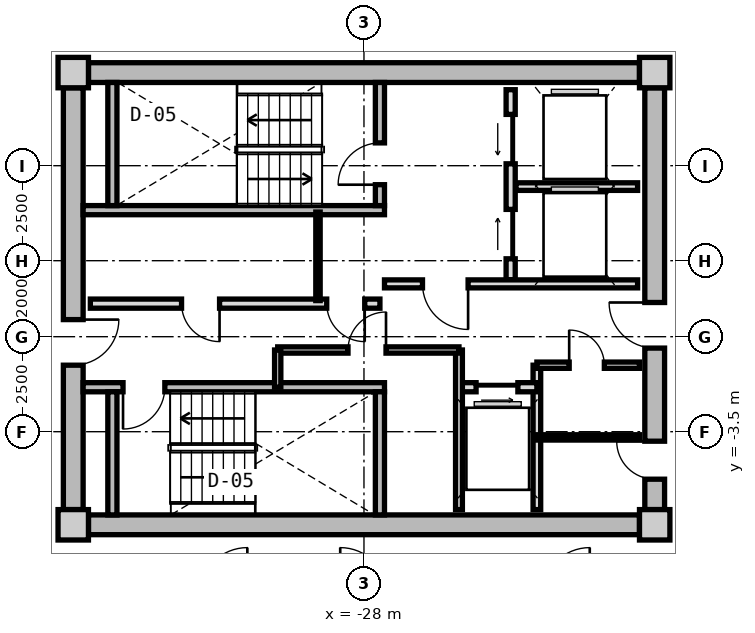
"""IFC4 building model, lengths in metres.
Left out: names, types, materials, properties, quantities, classifications, styles, units other than length and angle.
Written with IfcOpenShell. Run it as: python <this file> out.ifc"""

import sys

from ifc_helpers import new_model, si_unit, direction, frame, frame_2d, origin, origin_2d, place, context, subcontext, project, spatial, rectangle, extrude, source, transform, mapped, element, fill, save


model = new_model("IFC4")
c1 = context("Model", 3, precision=1e-05, world=origin(), true_north=direction((0.0, 1.0)))
c2 = subcontext(c1, "Body", "Model", "MODEL_VIEW")
j1 = project(units=[si_unit("LENGTHUNIT", "METRE"), si_unit("PLANEANGLEUNIT", "RADIAN")], contexts=[c1])
p1 = place(None, origin())
s1 = spatial("IfcSite", under=j1, at=p1, CompositionType="ELEMENT")
p2 = place(p1, origin())
s2 = spatial("IfcBuilding", under=s1, at=p2, CompositionType="ELEMENT")
p3 = place(p2, frame((0.0, 0.0, 207.8)))
s3 = spatial("IfcBuildingStorey", under=s2, at=p3, CompositionType="ELEMENT", Elevation=207.8)
m1 = source(origin(), c2, "Body", "SweptSolid", [
    extrude(rectangle(XDim=0.8, YDim=0.8, at=origin_2d()), origin(), (0.0, 0.0, 1.0), 3.05),
])
for number, where, z_axis, x_axis in (
    (1, (-35.65, -5.95, 0.0), (0.0, 0.0, 1.0), (1.0, 0.0, 0.0)),
    (2, (-20.35, -5.95, 0.0), (0.0, 0.0, 1.0), (1.0, 0.0, 0.0)),
    (3, (-20.35, 5.95, 0.0), (0.0, 0.0, 1.0), (1.0, 0.0, 0.0)),
    (4, (-35.65, 5.95, 0.0), (0.0, 0.0, 1.0), (1.0, 0.0, 0.0)),
):
    element("IfcColumn", number, at=place(p3, frame(where, z_axis=z_axis, x_axis=x_axis)), inside=s3, PredefinedType="COLUMN", context=c2, shape_type="MappedRepresentation", body=[
        mapped(m1, transform((0.0, 0.0, 0.0), x_axis=(1.0, 0.0, 0.0), y_axis=(0.0, 1.0, 0.0), z_axis=(0.0, 0.0, 1.0), scale=1.0)),
    ])
m2 = source(origin(), c2, "Body", "SweptSolid", [
    extrude(rectangle(XDim=14.5, YDim=0.52, at=frame_2d((7.25, 0.0))), origin(), (0.0, 0.0, 1.0), 2.76),
])
for number, where, z_axis, x_axis in (
    (5, (-35.25, 5.95, 0.0), (0.0, 0.0, 1.0), (1.0, 0.0, 0.0)),
    (6, (-20.75, -5.95, 0.0), (0.0, 0.0, 1.0), (-1.0, 0.0, 0.0)),
):
    element("IfcWall", number, at=place(p3, frame(where, z_axis=z_axis, x_axis=x_axis)), inside=s3, PredefinedType="SHEAR", context=c2, shape_type="MappedRepresentation", body=[
        mapped(m2, transform((0.0, 0.0, 0.0), x_axis=(1.0, 0.0, 0.0), y_axis=(0.0, 1.0, 0.0), z_axis=(0.0, 0.0, 1.0), scale=1.0)),
    ])
m3 = source(origin(), c2, "Body", "SweptSolid", [
    extrude(rectangle(XDim=11.1, YDim=0.52, at=frame_2d((5.55, 0.0))), origin(), (0.0, 0.0, 1.0), 2.76),
])
p4 = place(p3, frame((-35.65, -5.55, 0.0), z_axis=(0.0, 0.0, 1.0), x_axis=(0.0, 1.0, 0.0)))
e7 = element("IfcWall", 7, at=p4, inside=s3, PredefinedType="SHEAR", context=c2, shape_type="MappedRepresentation", body=[
    mapped(m3, transform((0.0, 0.0, 0.0), x_axis=(1.0, 0.0, 0.0), y_axis=(0.0, 1.0, 0.0), z_axis=(0.0, 0.0, 1.0), scale=1.0)),
])
p5 = place(p4, frame((3.8, 0.0, 0.0)))
e8 = element("IfcOpeningElement", 8, at=p5, cuts=e7, PredefinedType="OPENING", context=c2, shape_type="SweptSolid", body=[
    extrude(rectangle(XDim=1.2, YDim=2.15, at=frame_2d((0.6, 1.075))), frame((0.0, 0.27, 0.0), z_axis=(0.0, -1.0, 0.0), x_axis=(1.0, 0.0, 0.0)), (0.0, 0.0, 1.0), 0.54),
])
p6 = place(p3, frame((-20.35, 5.55, 0.0), z_axis=(0.0, 0.0, 1.0), x_axis=(0.0, -1.0, 0.0)))
e9 = element("IfcWall", 9, at=p6, inside=s3, PredefinedType="SHEAR", context=c2, shape_type="MappedRepresentation", body=[
    mapped(m3, transform((0.0, 0.0, 0.0), x_axis=(1.0, 0.0, 0.0), y_axis=(0.0, 1.0, 0.0), z_axis=(0.0, 0.0, 1.0), scale=1.0)),
])
p7 = place(p6, frame((5.65, 0.0, 0.0)))
e10 = element("IfcOpeningElement", 10, at=p7, cuts=e9, PredefinedType="OPENING", context=c2, shape_type="SweptSolid", body=[
    extrude(rectangle(XDim=1.2, YDim=2.15, at=frame_2d((0.6, 1.075))), frame((0.0, 0.27, 0.0), z_axis=(0.0, -1.0, 0.0), x_axis=(1.0, 0.0, 0.0)), (0.0, 0.0, 1.0), 0.54),
])
p8 = place(p6, frame((9.3, 0.0, 0.0)))
e11 = element("IfcOpeningElement", 11, at=p8, cuts=e9, PredefinedType="OPENING", context=c2, shape_type="SweptSolid", body=[
    extrude(rectangle(XDim=1.0, YDim=2.1, at=frame_2d((0.5, 1.05))), frame((0.0, 0.27, 0.0), z_axis=(0.0, -1.0, 0.0), x_axis=(1.0, 0.0, 0.0)), (0.0, 0.0, 1.0), 0.54),
])
m4 = source(origin(), c2, "Body", "SweptSolid", [
    extrude(rectangle(XDim=7.93, YDim=0.24, at=frame_2d((3.965, 0.0))), origin(), (0.0, 0.0, 1.0), 2.76),
])
p9 = place(p3, frame((-35.39, 2.33, 0.0), z_axis=(0.0, 0.0, 1.0), x_axis=(1.0, 0.0, 0.0)))
e12 = element("IfcWall", 12, at=p9, inside=s3, PredefinedType="PARTITIONING", context=c2, shape_type="MappedRepresentation", body=[
    mapped(m4, transform((0.0, 0.0, 0.0), x_axis=(1.0, 0.0, 0.0), y_axis=(0.0, 1.0, 0.0), z_axis=(0.0, 0.0, 1.0), scale=1.0)),
])
m5 = source(origin(), c2, "Body", "SweptSolid", [
    extrude(rectangle(XDim=3.24, YDim=0.24, at=frame_2d((1.62, 0.0))), origin(), (0.0, 0.0, 1.0), 2.76),
])
p10 = place(p3, frame((-34.62, 2.45, 0.0), z_axis=(0.0, 0.0, 1.0), x_axis=(0.0, 1.0, 0.0)))
e13 = element("IfcWall", 13, at=p10, inside=s3, PredefinedType="PARTITIONING", context=c2, shape_type="MappedRepresentation", body=[
    mapped(m5, transform((0.0, 0.0, 0.0), x_axis=(1.0, 0.0, 0.0), y_axis=(0.0, 1.0, 0.0), z_axis=(0.0, 0.0, 1.0), scale=1.0)),
])
p11 = place(p3, frame((-27.58, 2.45, 0.0), z_axis=(0.0, 0.0, 1.0), x_axis=(0.0, 1.0, 0.0)))
e14 = element("IfcWall", 14, at=p11, inside=s3, PredefinedType="PARTITIONING", context=c2, shape_type="MappedRepresentation", body=[
    mapped(m5, transform((0.0, 0.0, 0.0), x_axis=(1.0, 0.0, 0.0), y_axis=(0.0, 1.0, 0.0), z_axis=(0.0, 0.0, 1.0), scale=1.0)),
])
p12 = place(p11, frame((0.55, 0.0, 0.0)))
e15 = element("IfcOpeningElement", 15, at=p12, cuts=e14, PredefinedType="OPENING", context=c2, shape_type="SweptSolid", body=[
    extrude(rectangle(XDim=1.1, YDim=2.15, at=frame_2d((0.55, 1.075))), frame((0.0, 0.13, 0.0), z_axis=(0.0, -1.0, 0.0), x_axis=(1.0, 0.0, 0.0)), (0.0, 0.0, 1.0), 0.26),
])
p13 = place(p3, frame((-35.39, -2.33, 0.0), z_axis=(0.0, 0.0, 1.0), x_axis=(1.0, 0.0, 0.0)))
e16 = element("IfcWall", 16, at=p13, inside=s3, PredefinedType="PARTITIONING", context=c2, shape_type="MappedRepresentation", body=[
    mapped(m4, transform((0.0, 0.0, 0.0), x_axis=(1.0, 0.0, 0.0), y_axis=(0.0, 1.0, 0.0), z_axis=(0.0, 0.0, 1.0), scale=1.0)),
])
p14 = place(p13, frame((1.05, 0.0, 0.0)))
e17 = element("IfcOpeningElement", 17, at=p14, cuts=e16, PredefinedType="OPENING", context=c2, shape_type="SweptSolid", body=[
    extrude(rectangle(XDim=1.1, YDim=2.15, at=frame_2d((0.55, 1.075))), frame((0.0, 0.13, 0.0), z_axis=(0.0, -1.0, 0.0), x_axis=(1.0, 0.0, 0.0)), (0.0, 0.0, 1.0), 0.26),
])
for number, where, z_axis, x_axis in (
    (18, (-34.62, -5.69, 0.0), (0.0, 0.0, 1.0), (0.0, 1.0, 0.0)),
    (19, (-27.58, -5.69, 0.0), (0.0, 0.0, 1.0), (0.0, 1.0, 0.0)),
):
    element("IfcWall", number, at=place(p3, frame(where, z_axis=z_axis, x_axis=x_axis)), inside=s3, PredefinedType="PARTITIONING", context=c2, shape_type="MappedRepresentation", body=[
        mapped(m5, transform((0.0, 0.0, 0.0), x_axis=(1.0, 0.0, 0.0), y_axis=(0.0, 1.0, 0.0), z_axis=(0.0, 0.0, 1.0), scale=1.0)),
    ])
m6 = source(origin(), c2, "Body", "SweptSolid", [
    extrude(rectangle(XDim=5.0, YDim=0.24, at=frame_2d((2.5, 0.0))), origin(), (0.0, 0.0, 1.0), 2.745),
])
p15 = place(p3, frame((-24.14, 0.5, 0.0), z_axis=(0.0, 0.0, 1.0), x_axis=(0.0, 1.0, 0.0)))
e20 = element("IfcWall", 20, at=p15, inside=s3, PredefinedType="PARTITIONING", context=c2, shape_type="MappedRepresentation", body=[
    mapped(m6, transform((0.0, 0.0, 0.0), x_axis=(1.0, 0.0, 0.0), y_axis=(0.0, 1.0, 0.0), z_axis=(0.0, 0.0, 1.0), scale=1.0)),
])
p16 = place(p15, frame((3.05, 0.0, 0.0)))
e21 = element("IfcOpeningElement", 21, at=p16, cuts=e20, PredefinedType="OPENING", context=c2, shape_type="SweptSolid", body=[
    extrude(rectangle(XDim=1.3, YDim=2.2, at=frame_2d((0.65, 1.1))), frame((0.0, 0.13, 0.0), z_axis=(0.0, -1.0, 0.0), x_axis=(1.0, 0.0, 0.0)), (0.0, 0.0, 1.0), 0.26),
])
p17 = place(p15, frame((0.55, 0.0, 0.0)))
e22 = element("IfcOpeningElement", 22, at=p17, cuts=e20, PredefinedType="OPENING", context=c2, shape_type="SweptSolid", body=[
    extrude(rectangle(XDim=1.3, YDim=2.2, at=frame_2d((0.65, 1.1))), frame((0.0, 0.13, 0.0), z_axis=(0.0, -1.0, 0.0), x_axis=(1.0, 0.0, 0.0)), (0.0, 0.0, 1.0), 0.26),
])
m7 = source(origin(), c2, "Body", "SweptSolid", [
    extrude(rectangle(XDim=3.2, YDim=0.2, at=frame_2d((1.6, 0.0))), origin(), (0.0, 0.0, 1.0), 2.745),
])
p18 = place(p3, frame((-24.0, 2.95, 0.0), z_axis=(0.0, 0.0, 1.0), x_axis=(1.0, 0.0, 0.0)))
e23 = element("IfcWall", 23, at=p18, inside=s3, PredefinedType="PARTITIONING", context=c2, shape_type="MappedRepresentation", body=[
    mapped(m7, transform((0.0, 0.0, 0.0), x_axis=(1.0, 0.0, 0.0), y_axis=(0.0, 1.0, 0.0), z_axis=(0.0, 0.0, 1.0), scale=1.0)),
])
m8 = source(origin(), c2, "Body", "SweptSolid", [
    extrude(rectangle(XDim=6.66, YDim=0.21, at=frame_2d((3.33, 0.0))), origin(), (0.0, 0.0, 1.0), 2.745),
])
p19 = place(p3, frame((-27.46, 0.39, 0.0), z_axis=(0.0, 0.0, 1.0), x_axis=(1.0, 0.0, 0.0)))
e24 = element("IfcWall", 24, at=p19, inside=s3, PredefinedType="PARTITIONING", context=c2, shape_type="MappedRepresentation", body=[
    mapped(m8, transform((0.0, 0.0, 0.0), x_axis=(1.0, 0.0, 0.0), y_axis=(0.0, 1.0, 0.0), z_axis=(0.0, 0.0, 1.0), scale=1.0)),
])
p20 = place(p19, frame((1.0, 0.0, 0.0)))
e25 = element("IfcOpeningElement", 25, at=p20, cuts=e24, PredefinedType="OPENING", context=c2, shape_type="SweptSolid", body=[
    extrude(rectangle(XDim=1.2, YDim=2.15, at=frame_2d((0.6, 1.075))), frame((0.0, 0.115, 0.0), z_axis=(0.0, -1.0, 0.0), x_axis=(1.0, 0.0, 0.0)), (0.0, 0.0, 1.0), 0.23),
])
m9 = source(origin(), c2, "Body", "SweptSolid", [
    extrude(rectangle(XDim=7.62, YDim=0.24, at=frame_2d((3.81, 0.0))), origin(), (0.0, 0.0, 1.0), 2.745),
])
p21 = place(p3, frame((-35.2, -0.13, 0.0), z_axis=(0.0, 0.0, 1.0), x_axis=(1.0, 0.0, 0.0)))
e26 = element("IfcWall", 26, at=p21, inside=s3, PredefinedType="PARTITIONING", context=c2, shape_type="MappedRepresentation", body=[
    mapped(m9, transform((0.0, 0.0, 0.0), x_axis=(1.0, 0.0, 0.0), y_axis=(0.0, 1.0, 0.0), z_axis=(0.0, 0.0, 1.0), scale=1.0)),
])
p22 = place(p21, frame((6.22, 0.0, 0.0)))
e27 = element("IfcOpeningElement", 27, at=p22, cuts=e26, PredefinedType="OPENING", context=c2, shape_type="SweptSolid", body=[
    extrude(rectangle(XDim=1.0, YDim=2.1, at=frame_2d((0.5, 1.05))), frame((0.0, 0.13, 0.0), z_axis=(0.0, -1.0, 0.0), x_axis=(1.0, 0.0, 0.0)), (0.0, 0.0, 1.0), 0.26),
])
p23 = place(p21, frame((2.4, 0.0, 0.0)))
e28 = element("IfcOpeningElement", 28, at=p23, cuts=e26, PredefinedType="OPENING", context=c2, shape_type="SweptSolid", body=[
    extrude(rectangle(XDim=1.0, YDim=2.1, at=frame_2d((0.5, 1.05))), frame((0.0, 0.13, 0.0), z_axis=(0.0, -1.0, 0.0), x_axis=(1.0, 0.0, 0.0)), (0.0, 0.0, 1.0), 0.26),
])
m10 = source(origin(), c2, "Body", "SweptSolid", [
    extrude(rectangle(XDim=2.33, YDim=0.115, at=frame_2d((1.165, 0.0))), origin(), (0.0, 0.0, 1.0), 2.745),
])
p24 = place(p3, frame((-29.21, -0.05, 0.0), z_axis=(0.0, 0.0, 1.0), x_axis=(0.0, 1.0, 0.0)))
e29 = element("IfcWall", 29, at=p24, inside=s3, PredefinedType="PARTITIONING", context=c2, shape_type="MappedRepresentation", body=[
    mapped(m10, transform((0.0, 0.0, 0.0), x_axis=(1.0, 0.0, 0.0), y_axis=(0.0, 1.0, 0.0), z_axis=(0.0, 0.0, 1.0), scale=1.0)),
])
m11 = source(origin(), c2, "Body", "SweptSolid", [
    extrude(rectangle(XDim=3.8, YDim=0.2, at=frame_2d((1.9, 0.0))), origin(), (0.0, 0.0, 1.0), 2.745),
])
p25 = place(p3, frame((-23.45, -5.55, 0.0), z_axis=(0.0, 0.0, 1.0), x_axis=(0.0, 1.0, 0.0)))
e30 = element("IfcWall", 30, at=p25, inside=s3, PredefinedType="PARTITIONING", context=c2, shape_type="MappedRepresentation", body=[
    mapped(m11, transform((0.0, 0.0, 0.0), x_axis=(1.0, 0.0, 0.0), y_axis=(0.0, 1.0, 0.0), z_axis=(0.0, 0.0, 1.0), scale=1.0)),
])
m12 = source(origin(), c2, "Body", "SweptSolid", [
    extrude(rectangle(XDim=2.05, YDim=0.24, at=frame_2d((1.025, 0.0))), origin(), (0.0, 0.0, 1.0), 2.745),
])
p26 = place(p3, frame((-25.5, -2.33, 0.0), z_axis=(0.0, 0.0, 1.0), x_axis=(1.0, 0.0, 0.0)))
e31 = element("IfcWall", 31, at=p26, inside=s3, PredefinedType="PARTITIONING", context=c2, shape_type="MappedRepresentation", body=[
    mapped(m12, transform((0.0, 0.0, 0.0), x_axis=(1.0, 0.0, 0.0), y_axis=(0.0, 1.0, 0.0), z_axis=(0.0, 0.0, 1.0), scale=1.0)),
])
p27 = place(p26, frame((0.45, 0.0, 0.0)))
e32 = element("IfcOpeningElement", 32, at=p27, cuts=e31, PredefinedType="OPENING", context=c2, shape_type="SweptSolid", body=[
    extrude(rectangle(XDim=1.1, YDim=2.2, at=frame_2d((0.55, 1.1))), frame((0.0, 0.13, 0.0), z_axis=(0.0, -1.0, 0.0), x_axis=(1.0, 0.0, 0.0)), (0.0, 0.0, 1.0), 0.26),
])
m13 = source(origin(), c2, "Body", "SweptSolid", [
    extrude(rectangle(XDim=4.2, YDim=0.18, at=frame_2d((2.1, 0.0))), origin(), (0.0, 0.0, 1.0), 2.745),
])
p28 = place(p3, frame((-25.5, -5.55, 0.0), z_axis=(0.0, 0.0, 1.0), x_axis=(0.0, 1.0, 0.0)))
e33 = element("IfcWall", 33, at=p28, inside=s3, PredefinedType="PARTITIONING", context=c2, shape_type="MappedRepresentation", body=[
    mapped(m13, transform((0.0, 0.0, 0.0), x_axis=(1.0, 0.0, 0.0), y_axis=(0.0, 1.0, 0.0), z_axis=(0.0, 0.0, 1.0), scale=1.0)),
])
m14 = source(origin(), c2, "Body", "SweptSolid", [
    extrude(rectangle(XDim=4.77, YDim=0.165, at=frame_2d((2.385, 0.0))), origin(), (0.0, 0.0, 1.0), 2.745),
])
p29 = place(p3, frame((-30.27, -1.35, 0.0), z_axis=(0.0, 0.0, 1.0), x_axis=(1.0, 0.0, 0.0)))
e34 = element("IfcWall", 34, at=p29, inside=s3, PredefinedType="PARTITIONING", context=c2, shape_type="MappedRepresentation", body=[
    mapped(m14, transform((0.0, 0.0, 0.0), x_axis=(1.0, 0.0, 0.0), y_axis=(0.0, 1.0, 0.0), z_axis=(0.0, 0.0, 1.0), scale=1.0)),
])
p30 = place(p29, frame((1.85, 0.0, 0.0)))
e35 = element("IfcOpeningElement", 35, at=p30, cuts=e34, PredefinedType="OPENING", context=c2, shape_type="SweptSolid", body=[
    extrude(rectangle(XDim=1.0, YDim=2.1, at=frame_2d((0.5, 1.05))), frame((0.0, 0.093, 0.0), z_axis=(0.0, -1.0, 0.0), x_axis=(1.0, 0.0, 0.0)), (0.0, 0.0, 1.0), 0.185),
])
m15 = source(origin(), c2, "Body", "SweptSolid", [
    extrude(rectangle(XDim=0.98, YDim=0.165, at=frame_2d((0.49, 0.0))), origin(), (0.0, 0.0, 1.0), 2.745),
])
p31 = place(p3, frame((-30.27, -2.33, 0.0), z_axis=(0.0, 0.0, 1.0), x_axis=(0.0, 1.0, 0.0)))
e36 = element("IfcWall", 36, at=p31, inside=s3, PredefinedType="PARTITIONING", context=c2, shape_type="MappedRepresentation", body=[
    mapped(m15, transform((0.0, 0.0, 0.0), x_axis=(1.0, 0.0, 0.0), y_axis=(0.0, 1.0, 0.0), z_axis=(0.0, 0.0, 1.0), scale=1.0)),
])
m16 = source(origin(), c2, "Body", "SweptSolid", [
    extrude(rectangle(XDim=2.7, YDim=0.165, at=frame_2d((1.35, 0.0))), origin(), (0.0, 0.0, 1.0), 2.745),
])
p32 = place(p3, frame((-23.45, -1.75, 0.0), z_axis=(0.0, 0.0, 1.0), x_axis=(1.0, 0.0, 0.0)))
e37 = element("IfcWall", 37, at=p32, inside=s3, PredefinedType="PARTITIONING", context=c2, shape_type="MappedRepresentation", body=[
    mapped(m16, transform((0.0, 0.0, 0.0), x_axis=(1.0, 0.0, 0.0), y_axis=(0.0, 1.0, 0.0), z_axis=(0.0, 0.0, 1.0), scale=1.0)),
])
p33 = place(p32, frame((0.85, 0.0, 0.0)))
e38 = element("IfcOpeningElement", 38, at=p33, cuts=e37, PredefinedType="OPENING", context=c2, shape_type="SweptSolid", body=[
    extrude(rectangle(XDim=0.925, YDim=2.1, at=frame_2d((0.462, 1.05))), frame((0.0, 0.093, 0.0), z_axis=(0.0, -1.0, 0.0), x_axis=(1.0, 0.0, 0.0)), (0.0, 0.0, 1.0), 0.185),
])
m17 = source(origin(), c2, "Body", "SweptSolid", [
    extrude(rectangle(XDim=2.7, YDim=0.14, at=frame_2d((1.35, 0.0))), origin(), (0.0, 0.0, 1.0), 2.745),
])
p34 = place(p3, frame((-23.45, -3.65, 0.0), z_axis=(0.0, 0.0, 1.0), x_axis=(1.0, 0.0, 0.0)))
e39 = element("IfcWall", 39, at=p34, inside=s3, PredefinedType="PARTITIONING", context=c2, shape_type="MappedRepresentation", body=[
    mapped(m17, transform((0.0, 0.0, 0.0), x_axis=(1.0, 0.0, 0.0), y_axis=(0.0, 1.0, 0.0), z_axis=(0.0, 0.0, 1.0), scale=1.0)),
])
m18 = source(origin(), c2, "Body", "SweptSolid", [
    extrude(rectangle(XDim=1.1, YDim=2.15, at=frame_2d((0.55, 1.075))), frame((0.0, 0.025, 0.0), z_axis=(0.0, -1.0, 0.0), x_axis=(1.0, 0.0, 0.0)), (0.0, 0.0, 1.0), 0.05),
])
p35 = place(p12, origin())
e40 = element("IfcDoor", 40, at=p35, inside=s3, OperationType="SINGLE_SWING_LEFT", PredefinedType="DOOR", context=c2, shape_type="MappedRepresentation", body=[
    mapped(m18, transform((0.0, 0.0, 0.0), x_axis=(1.0, 0.0, 0.0), y_axis=(0.0, 1.0, 0.0), z_axis=(0.0, 0.0, 1.0), scale=1.0)),
])
fill(e15, e40)
p36 = place(p14, frame((1.1, 0.0, 0.0), z_axis=(0.0, 0.0, 1.0), x_axis=(-1.0, 0.0, 0.0)))
e41 = element("IfcDoor", 41, at=p36, inside=s3, OperationType="SINGLE_SWING_RIGHT", PredefinedType="DOOR", context=c2, shape_type="MappedRepresentation", body=[
    mapped(m18, transform((0.0, 0.0, 0.0), x_axis=(1.0, 0.0, 0.0), y_axis=(0.0, 1.0, 0.0), z_axis=(0.0, 0.0, 1.0), scale=1.0)),
])
fill(e17, e41)
m19 = source(origin(), c2, "Body", "SweptSolid", [
    extrude(rectangle(XDim=1.3, YDim=2.2, at=frame_2d((0.65, 1.1))), frame((0.0, 0.025, 0.0), z_axis=(0.0, -1.0, 0.0), x_axis=(1.0, 0.0, 0.0)), (0.0, 0.0, 1.0), 0.05),
])
p37 = place(p16, origin())
e42 = element("IfcDoor", 42, at=p37, inside=s3, OperationType="SLIDING_TO_LEFT", PredefinedType="DOOR", context=c2, shape_type="MappedRepresentation", body=[
    mapped(m19, transform((0.0, 0.0, 0.0), x_axis=(1.0, 0.0, 0.0), y_axis=(0.0, 1.0, 0.0), z_axis=(0.0, 0.0, 1.0), scale=1.0)),
])
fill(e21, e42)
p38 = place(p17, origin())
e43 = element("IfcDoor", 43, at=p38, inside=s3, OperationType="SLIDING_TO_RIGHT", PredefinedType="DOOR", context=c2, shape_type="MappedRepresentation", body=[
    mapped(m19, transform((0.0, 0.0, 0.0), x_axis=(1.0, 0.0, 0.0), y_axis=(0.0, 1.0, 0.0), z_axis=(0.0, 0.0, 1.0), scale=1.0)),
])
fill(e22, e43)
m20 = source(origin(), c2, "Body", "SweptSolid", [
    extrude(rectangle(XDim=1.2, YDim=2.15, at=frame_2d((0.6, 1.075))), frame((0.0, 0.025, 0.0), z_axis=(0.0, -1.0, 0.0), x_axis=(1.0, 0.0, 0.0)), (0.0, 0.0, 1.0), 0.05),
])
p39 = place(p20, frame((1.2, 0.0, 0.0), z_axis=(0.0, 0.0, 1.0), x_axis=(-1.0, 0.0, 0.0)))
e44 = element("IfcDoor", 44, at=p39, inside=s3, OperationType="SINGLE_SWING_LEFT", PredefinedType="DOOR", context=c2, shape_type="MappedRepresentation", body=[
    mapped(m20, transform((0.0, 0.0, 0.0), x_axis=(1.0, 0.0, 0.0), y_axis=(0.0, 1.0, 0.0), z_axis=(0.0, 0.0, 1.0), scale=1.0)),
])
fill(e25, e44)
p40 = place(p5, frame((1.2, 0.0, 0.0), z_axis=(0.0, 0.0, 1.0), x_axis=(-1.0, 0.0, 0.0)))
e45 = element("IfcDoor", 45, at=p40, inside=s3, OperationType="SINGLE_SWING_LEFT", PredefinedType="DOOR", context=c2, shape_type="MappedRepresentation", body=[
    mapped(m20, transform((0.0, 0.0, 0.0), x_axis=(1.0, 0.0, 0.0), y_axis=(0.0, 1.0, 0.0), z_axis=(0.0, 0.0, 1.0), scale=1.0)),
])
fill(e8, e45)
p41 = place(p7, frame((1.2, 0.0, 0.0), z_axis=(0.0, 0.0, 1.0), x_axis=(-1.0, 0.0, 0.0)))
e46 = element("IfcDoor", 46, at=p41, inside=s3, OperationType="SINGLE_SWING_RIGHT", PredefinedType="DOOR", context=c2, shape_type="MappedRepresentation", body=[
    mapped(m20, transform((0.0, 0.0, 0.0), x_axis=(1.0, 0.0, 0.0), y_axis=(0.0, 1.0, 0.0), z_axis=(0.0, 0.0, 1.0), scale=1.0)),
])
fill(e10, e46)
m21 = source(origin(), c2, "Body", "SweptSolid", [
    extrude(rectangle(XDim=1.0, YDim=2.1, at=frame_2d((0.5, 1.05))), frame((0.0, 0.025, 0.0), z_axis=(0.0, -1.0, 0.0), x_axis=(1.0, 0.0, 0.0)), (0.0, 0.0, 1.0), 0.05),
])
p42 = place(p22, frame((1.0, 0.0, 0.0), z_axis=(0.0, 0.0, 1.0), x_axis=(-1.0, 0.0, 0.0)))
e47 = element("IfcDoor", 47, at=p42, inside=s3, OperationType="SINGLE_SWING_LEFT", PredefinedType="DOOR", context=c2, shape_type="MappedRepresentation", body=[
    mapped(m21, transform((0.0, 0.0, 0.0), x_axis=(1.0, 0.0, 0.0), y_axis=(0.0, 1.0, 0.0), z_axis=(0.0, 0.0, 1.0), scale=1.0)),
])
fill(e27, e47)
p43 = place(p23, frame((1.0, 0.0, 0.0), z_axis=(0.0, 0.0, 1.0), x_axis=(-1.0, 0.0, 0.0)))
e48 = element("IfcDoor", 48, at=p43, inside=s3, OperationType="SINGLE_SWING_LEFT", PredefinedType="DOOR", context=c2, shape_type="MappedRepresentation", body=[
    mapped(m21, transform((0.0, 0.0, 0.0), x_axis=(1.0, 0.0, 0.0), y_axis=(0.0, 1.0, 0.0), z_axis=(0.0, 0.0, 1.0), scale=1.0)),
])
fill(e28, e48)
m22 = source(origin(), c2, "Body", "SweptSolid", [
    extrude(rectangle(XDim=1.1, YDim=2.2, at=frame_2d((0.55, 1.1))), frame((0.0, 0.025, 0.0), z_axis=(0.0, -1.0, 0.0), x_axis=(1.0, 0.0, 0.0)), (0.0, 0.0, 1.0), 0.05),
])
p44 = place(p27, frame((1.1, 0.0, 0.0), z_axis=(0.0, 0.0, 1.0), x_axis=(-1.0, 0.0, 0.0)))
e49 = element("IfcDoor", 49, at=p44, inside=s3, OperationType="SLIDING_TO_RIGHT", PredefinedType="DOOR", context=c2, shape_type="MappedRepresentation", body=[
    mapped(m22, transform((0.0, 0.0, 0.0), x_axis=(1.0, 0.0, 0.0), y_axis=(0.0, 1.0, 0.0), z_axis=(0.0, 0.0, 1.0), scale=1.0)),
])
fill(e32, e49)
p45 = place(p30, origin())
e50 = element("IfcDoor", 50, at=p45, inside=s3, OperationType="SINGLE_SWING_RIGHT", PredefinedType="DOOR", context=c2, shape_type="MappedRepresentation", body=[
    mapped(m21, transform((0.0, 0.0, 0.0), x_axis=(1.0, 0.0, 0.0), y_axis=(0.0, 1.0, 0.0), z_axis=(0.0, 0.0, 1.0), scale=1.0)),
])
fill(e35, e50)
m23 = source(origin(), c2, "Body", "SweptSolid", [
    extrude(rectangle(XDim=0.925, YDim=2.1, at=frame_2d((0.462, 1.05))), frame((0.0, 0.025, 0.0), z_axis=(0.0, -1.0, 0.0), x_axis=(1.0, 0.0, 0.0)), (0.0, 0.0, 1.0), 0.05),
])
p46 = place(p33, origin())
e51 = element("IfcDoor", 51, at=p46, inside=s3, OperationType="SINGLE_SWING_LEFT", PredefinedType="DOOR", context=c2, shape_type="MappedRepresentation", body=[
    mapped(m23, transform((0.0, 0.0, 0.0), x_axis=(1.0, 0.0, 0.0), y_axis=(0.0, 1.0, 0.0), z_axis=(0.0, 0.0, 1.0), scale=1.0)),
])
fill(e38, e51)
p47 = place(p8, frame((1.0, 0.0, 0.0), z_axis=(0.0, 0.0, 1.0), x_axis=(-1.0, 0.0, 0.0)))
e52 = element("IfcDoor", 52, at=p47, inside=s3, OperationType="SINGLE_SWING_RIGHT", PredefinedType="DOOR", context=c2, shape_type="MappedRepresentation", body=[
    mapped(m21, transform((0.0, 0.0, 0.0), x_axis=(1.0, 0.0, 0.0), y_axis=(0.0, 1.0, 0.0), z_axis=(0.0, 0.0, 1.0), scale=1.0)),
])
fill(e11, e52)
save(model, sys.argv[1])
